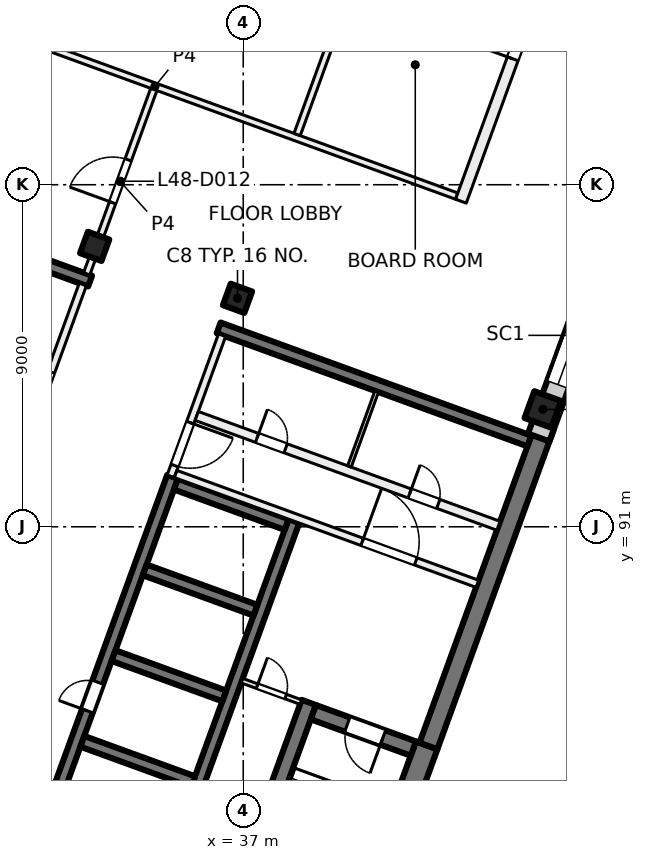
"""IFC4 building model, lengths in metres.
Left out: names, types, materials, properties, quantities, classifications, styles, units other than length and angle.
Written with IfcOpenShell. Run it as: python <this file> out.ifc"""

import sys

from ifc_helpers import new_model, si_unit, direction, frame, frame_2d, origin, origin_2d, place, context, subcontext, project, spatial, rectangle, extrude, element, fill, save


model = new_model("IFC4")
c1 = context("Model", 3, precision=1e-05, world=origin(), true_north=direction((0.0, 1.0)))
c2 = subcontext(c1, "Body", "Model", "MODEL_VIEW")
j1 = project(units=[si_unit("LENGTHUNIT", "METRE"), si_unit("PLANEANGLEUNIT", "RADIAN")], contexts=[c1])
p1 = place(None, origin())
s1 = spatial("IfcSite", under=j1, at=p1, CompositionType="ELEMENT")
p2 = place(p1, origin())
s2 = spatial("IfcBuilding", under=s1, at=p2, CompositionType="ELEMENT")
p3 = place(p2, frame((0.0, 0.0, 204.0)))
s3 = spatial("IfcBuildingStorey", under=s2, at=p3, CompositionType="ELEMENT", Elevation=204.0)
for number, where, z_axis, x_axis in (
    (1, (36.849, 97.011, 0.0), (0.0, 0.0, 1.0), (-0.342, -0.94, 0.0)),
    (2, (33.091, 98.379, 0.0), (0.0, 0.0, 1.0), (-0.342, -0.94, 0.0)),
):
    element("IfcColumn", number, at=place(p3, frame(where, z_axis=z_axis, x_axis=x_axis)), inside=s3, PredefinedType="COLUMN", context=c2, shape_type="SweptSolid", body=[
        extrude(rectangle(XDim=0.6, YDim=0.6, at=origin_2d()), origin(), (0.0, 0.0, 1.0), 4.0),
    ])
p4 = place(p3, frame((44.884, 94.087, 0.0), z_axis=(0.0, 0.0, 1.0), x_axis=(-0.342020143326, -0.939692620786, 0.0)))
e3 = element("IfcColumn", 3, at=p4, inside=s3, PredefinedType="COLUMN", context=c2, shape_type="SweptSolid", body=[
    extrude(rectangle(XDim=0.75, YDim=0.75, at=origin_2d()), origin(), (0.0, 0.0, 1.0), 4.0),
])
p5 = place(p3, frame((39.159, 77.92, 0.0), z_axis=(0.0, 0.0, 1.0), x_axis=(0.342016982193, 0.939693771338, 0.0)))
e4 = element("IfcWall", 4, at=p5, inside=s3, PredefinedType="SHEAR", context=c2, shape_type="SweptSolid", body=[
    extrude(rectangle(XDim=7.8, YDim=0.6, at=frame_2d((3.9, 0.0))), origin(), (0.0, 0.0, 1.0), 4.0),
])
p6 = place(p3, frame((41.874, 85.232, 0.0), z_axis=(0.0, 0.0, 1.0), x_axis=(0.342020437038, 0.939692513883, 0.0)))
e5 = element("IfcWall", 5, at=p6, inside=s3, PredefinedType="SHEAR", context=c2, shape_type="SweptSolid", body=[
    extrude(rectangle(XDim=8.975, YDim=0.5, at=frame_2d((4.487, 0.0))), origin(), (0.0, 0.0, 1.0), 4.0),
])
p7 = place(p3, frame((36.058, 79.048, 0.0), z_axis=(0.0, 0.0, 1.0), x_axis=(0.342016982193, 0.939693771338, 0.0)))
e6 = element("IfcWall", 6, at=p7, inside=s3, PredefinedType="SHEAR", context=c2, shape_type="SweptSolid", body=[
    extrude(rectangle(XDim=7.8, YDim=0.4, at=frame_2d((3.9, 0.0))), origin(), (0.0, 0.0, 1.0), 4.0),
])
p8 = place(p3, frame((41.476, 85.164, 0.0), z_axis=(0.0, 0.0, 1.0), x_axis=(-0.939678810556, 0.342058084236, 0.0)))
e7 = element("IfcWall", 7, at=p8, inside=s3, PredefinedType="SHEAR", context=c2, shape_type="SweptSolid", body=[
    extrude(rectangle(XDim=2.8, YDim=0.4, at=frame_2d((1.4, 0.0))), origin(), (0.0, 0.0, 1.0), 4.0),
])
p9 = place(p8, frame((0.85, 0.0, 0.0)))
e8 = element("IfcOpeningElement", 8, at=p9, cuts=e7, PredefinedType="OPENING", context=c2, shape_type="SweptSolid", body=[
    extrude(rectangle(XDim=1.0, YDim=2.1, at=frame_2d((0.5, 1.05))), frame((0.0, 0.21, 0.0), z_axis=(0.0, -1.0, 0.0), x_axis=(1.0, 0.0, 0.0)), (0.0, 0.0, 1.0), 0.42),
])
p10 = place(p3, frame((30.949, 80.801, 0.0), z_axis=(0.0, 0.0, 1.0), x_axis=(0.342016684409, 0.939693879721, 0.0)))
e9 = element("IfcWall", 9, at=p10, inside=s3, PredefinedType="SHEAR", context=c2, shape_type="SweptSolid", body=[
    extrude(rectangle(XDim=12.25, YDim=0.3, at=frame_2d((6.125, 0.0))), origin(), (0.0, 0.0, 1.0), 4.0),
])
p11 = place(p10, frame((0.9, 0.0, 0.0)))
e10 = element("IfcOpeningElement", 10, at=p11, cuts=e9, PredefinedType="OPENING", context=c2, shape_type="SweptSolid", body=[
    extrude(rectangle(XDim=0.8, YDim=2.1, at=frame_2d((0.4, 1.05))), frame((0.0, 0.16, 0.0), z_axis=(0.0, -1.0, 0.0), x_axis=(1.0, 0.0, 0.0)), (0.0, 0.0, 1.0), 0.32),
])
p12 = place(p10, frame((5.7, 0.0, 0.0)))
e11 = element("IfcOpeningElement", 11, at=p12, cuts=e9, PredefinedType="OPENING", context=c2, shape_type="SweptSolid", body=[
    extrude(rectangle(XDim=0.8, YDim=2.1, at=frame_2d((0.4, 1.05))), frame((0.0, 0.16, 0.0), z_axis=(0.0, -1.0, 0.0), x_axis=(1.0, 0.0, 0.0)), (0.0, 0.0, 1.0), 0.32),
])
p13 = place(p3, frame((34.144, 79.638, 0.0), z_axis=(0.0, 0.0, 1.0), x_axis=(0.342016684409, 0.939693879721, 0.0)))
e12 = element("IfcWall", 12, at=p13, inside=s3, PredefinedType="SHEAR", context=c2, shape_type="SweptSolid", body=[
    extrude(rectangle(XDim=12.25, YDim=0.3, at=frame_2d((6.125, 0.0))), origin(), (0.0, 0.0, 1.0), 4.0),
])
p14 = place(p3, frame((35.679, 84.294, 0.0), z_axis=(0.0, 0.0, 1.0), x_axis=(-0.939706007505, 0.341983361377, 0.0)))
e13 = element("IfcWall", 13, at=p14, inside=s3, PredefinedType="SHEAR", context=c2, shape_type="SweptSolid", body=[
    extrude(rectangle(XDim=3.1, YDim=0.3, at=frame_2d((1.55, 0.0))), origin(), (0.0, 0.0, 1.0), 4.0),
])
for number, where, z_axis, x_axis in (
    (14, (36.5, 86.549, 0.0), (0.0, 0.0, 1.0), (-0.94, 0.342, 0.0)),
    (15, (37.321, 88.805, 0.0), (0.0, 0.0, 1.0), (-0.94, 0.342, 0.0)),
    (16, (38.142, 91.06, 0.0), (0.0, 0.0, 1.0), (-0.94, 0.342, 0.0)),
):
    element("IfcWall", number, at=place(p3, frame(where, z_axis=z_axis, x_axis=x_axis)), inside=s3, PredefinedType="SHEAR", context=c2, shape_type="SweptSolid", body=[
        extrude(rectangle(XDim=3.1, YDim=0.3, at=frame_2d((1.55, 0.0))), origin(), (0.0, 0.0, 1.0), 4.0),
    ])
p15 = place(p3, frame((44.529, 93.258, 0.0), z_axis=(0.0, 0.0, 1.0), x_axis=(-0.9396917844, 0.342022441267, 0.0)))
e17 = element("IfcWall", 17, at=p15, inside=s3, PredefinedType="SHEAR", context=c2, shape_type="SweptSolid", body=[
    extrude(rectangle(XDim=8.7, YDim=0.3, at=frame_2d((4.35, 0.0))), origin(), (0.0, 0.0, 1.0), 4.0),
])
p16 = place(p3, frame((32.971, 97.465, 0.0), z_axis=(0.0, 0.0, 1.0), x_axis=(-0.939695066972, 0.34201342241, 0.0)))
e18 = element("IfcWall", 18, at=p16, inside=s3, PredefinedType="SHEAR", context=c2, shape_type="SweptSolid", body=[
    extrude(rectangle(XDim=8.7, YDim=0.3, at=frame_2d((4.35, 0.0))), origin(), (0.0, 0.0, 1.0), 4.0),
])
p17 = place(p3, frame((52.212, 113.783, 0.0), z_axis=(0.0, 0.0, 1.0), x_axis=(-0.34202521188, -0.939690775968, 0.0)))
e19 = element("IfcWall", 19, at=p17, inside=s3, PredefinedType="SOLIDWALL", context=c2, shape_type="SweptSolid", body=[
    extrude(rectangle(XDim=21.745, YDim=0.6, at=frame_2d((10.873, 0.0))), origin(), (0.0, 0.0, 1.0), 3.625),
])
p18 = place(p17, frame((3.765, 0.0, 0.9)))
e20 = element("IfcOpeningElement", 20, at=p18, cuts=e19, PredefinedType="OPENING", context=c2, shape_type="SweptSolid", body=[
    extrude(rectangle(XDim=3.0, YDim=2.4, at=frame_2d((1.5, 1.2))), frame((0.0, 0.31, 0.0), z_axis=(0.0, -1.0, 0.0), x_axis=(1.0, 0.0, 0.0)), (0.0, 0.0, 1.0), 0.62),
])
p19 = place(p17, frame((8.265, 0.0, 0.9)))
e21 = element("IfcOpeningElement", 21, at=p19, cuts=e19, PredefinedType="OPENING", context=c2, shape_type="SweptSolid", body=[
    extrude(rectangle(XDim=3.0, YDim=2.4, at=frame_2d((1.5, 1.2))), frame((0.0, 0.31, 0.0), z_axis=(0.0, -1.0, 0.0), x_axis=(1.0, 0.0, 0.0)), (0.0, 0.0, 1.0), 0.62),
])
p20 = place(p17, frame((12.765, 0.0, 0.9)))
e22 = element("IfcOpeningElement", 22, at=p20, cuts=e19, PredefinedType="OPENING", context=c2, shape_type="SweptSolid", body=[
    extrude(rectangle(XDim=3.0, YDim=2.4, at=frame_2d((1.5, 1.2))), frame((0.0, 0.31, 0.0), z_axis=(0.0, -1.0, 0.0), x_axis=(1.0, 0.0, 0.0)), (0.0, 0.0, 1.0), 0.62),
])
p21 = place(p17, frame((17.265, 0.0, 0.9)))
e23 = element("IfcOpeningElement", 23, at=p21, cuts=e19, PredefinedType="OPENING", context=c2, shape_type="SweptSolid", body=[
    extrude(rectangle(XDim=3.0, YDim=2.4, at=frame_2d((1.5, 1.2))), frame((0.0, 0.31, 0.0), z_axis=(0.0, -1.0, 0.0), x_axis=(1.0, 0.0, 0.0)), (0.0, 0.0, 1.0), 0.62),
])
p22 = place(p3, frame((24.666, 100.669, 0.0), z_axis=(0.0, 0.0, 1.0), x_axis=(0.34201964167, 0.939692803373, 0.0)))
e24 = element("IfcWall", 24, at=p22, inside=s3, PredefinedType="SOLIDWALL", context=c2, shape_type="SweptSolid", body=[
    extrude(rectangle(XDim=32.884, YDim=0.6, at=frame_2d((16.442, 0.0))), origin(), (0.0, 0.0, 1.0), 3.625),
])
p23 = place(p22, frame((1.48, 0.0, 0.9)))
e25 = element("IfcOpeningElement", 25, at=p23, cuts=e24, PredefinedType="OPENING", context=c2, shape_type="SweptSolid", body=[
    extrude(rectangle(XDim=3.0, YDim=2.4, at=frame_2d((1.5, 1.2))), frame((0.0, 0.31, 0.0), z_axis=(0.0, -1.0, 0.0), x_axis=(1.0, 0.0, 0.0)), (0.0, 0.0, 1.0), 0.62),
])
p24 = place(p22, frame((5.98, 0.0, 0.9)))
e26 = element("IfcOpeningElement", 26, at=p24, cuts=e24, PredefinedType="OPENING", context=c2, shape_type="SweptSolid", body=[
    extrude(rectangle(XDim=3.0, YDim=2.4, at=frame_2d((1.5, 1.2))), frame((0.0, 0.31, 0.0), z_axis=(0.0, -1.0, 0.0), x_axis=(1.0, 0.0, 0.0)), (0.0, 0.0, 1.0), 0.62),
])
p25 = place(p22, frame((10.48, 0.0, 0.9)))
e27 = element("IfcOpeningElement", 27, at=p25, cuts=e24, PredefinedType="OPENING", context=c2, shape_type="SweptSolid", body=[
    extrude(rectangle(XDim=3.0, YDim=2.4, at=frame_2d((1.5, 1.2))), frame((0.0, 0.31, 0.0), z_axis=(0.0, -1.0, 0.0), x_axis=(1.0, 0.0, 0.0)), (0.0, 0.0, 1.0), 0.62),
])
p26 = place(p22, frame((15.58, 0.0, 0.0)))
e28 = element("IfcOpeningElement", 28, at=p26, cuts=e24, PredefinedType="OPENING", context=c2, shape_type="SweptSolid", body=[
    extrude(rectangle(XDim=1.8, YDim=2.4, at=frame_2d((0.9, 1.2))), frame((0.0, 0.31, 0.0), z_axis=(0.0, -1.0, 0.0), x_axis=(1.0, 0.0, 0.0)), (0.0, 0.0, 1.0), 0.62),
])
p27 = place(p22, frame((19.48, 0.0, 0.9)))
e29 = element("IfcOpeningElement", 29, at=p27, cuts=e24, PredefinedType="OPENING", context=c2, shape_type="SweptSolid", body=[
    extrude(rectangle(XDim=3.0, YDim=2.4, at=frame_2d((1.5, 1.2))), frame((0.0, 0.31, 0.0), z_axis=(0.0, -1.0, 0.0), x_axis=(1.0, 0.0, 0.0)), (0.0, 0.0, 1.0), 0.62),
])
p28 = place(p22, frame((23.98, 0.0, 0.9)))
e30 = element("IfcOpeningElement", 30, at=p28, cuts=e24, PredefinedType="OPENING", context=c2, shape_type="SweptSolid", body=[
    extrude(rectangle(XDim=3.0, YDim=2.4, at=frame_2d((1.5, 1.2))), frame((0.0, 0.31, 0.0), z_axis=(0.0, -1.0, 0.0), x_axis=(1.0, 0.0, 0.0)), (0.0, 0.0, 1.0), 0.62),
])
p29 = place(p22, frame((29.08, 0.0, 0.0)))
e31 = element("IfcOpeningElement", 31, at=p29, cuts=e24, PredefinedType="OPENING", context=c2, shape_type="SweptSolid", body=[
    extrude(rectangle(XDim=1.8, YDim=2.4, at=frame_2d((0.9, 1.2))), frame((0.0, 0.31, 0.0), z_axis=(0.0, -1.0, 0.0), x_axis=(1.0, 0.0, 0.0)), (0.0, 0.0, 1.0), 0.62),
])
p30 = place(p3, frame((31.427, 93.663, 0.0), z_axis=(0.0, 0.0, 1.0), x_axis=(0.342030870568, 0.93968871632, 0.0)))
e32 = element("IfcWall", 32, at=p30, inside=s3, PredefinedType="PARTITIONING", context=c2, shape_type="SweptSolid", body=[
    extrude(rectangle(XDim=3.95, YDim=0.2, at=frame_2d((1.975, 0.0))), origin(), (0.0, 0.0, 1.0), 3.625),
])
p31 = place(p30, frame((0.3, 0.0, 0.0)))
e33 = element("IfcOpeningElement", 33, at=p31, cuts=e32, PredefinedType="OPENING", context=c2, shape_type="SweptSolid", body=[
    extrude(rectangle(XDim=1.2, YDim=2.1, at=frame_2d((0.6, 1.05))), frame((0.0, 0.11, 0.0), z_axis=(0.0, -1.0, 0.0), x_axis=(1.0, 0.0, 0.0)), (0.0, 0.0, 1.0), 0.22),
])
p32 = place(p3, frame((23.983, 98.208, 0.0), z_axis=(0.0, 0.0, 1.0), x_axis=(0.939699751196, -0.342000552051, 0.0)))
e34 = element("IfcWall", 34, at=p32, inside=s3, PredefinedType="PARTITIONING", context=c2, shape_type="SweptSolid", body=[
    extrude(rectangle(XDim=8.45, YDim=0.25, at=frame_2d((4.225, 0.0))), origin(), (0.0, 0.0, 1.0), 3.625),
])
p33 = place(p32, frame((5.96, 0.0, 0.0)))
e35 = element("IfcOpeningElement", 35, at=p33, cuts=e34, PredefinedType="OPENING", context=c2, shape_type="SweptSolid", body=[
    extrude(rectangle(XDim=0.8, YDim=2.1, at=frame_2d((0.4, 1.05))), frame((0.0, 0.135, 0.0), z_axis=(0.0, -1.0, 0.0), x_axis=(1.0, 0.0, 0.0)), (0.0, 0.0, 1.0), 0.27),
])
p34 = place(p32, frame((1.585, 0.0, 0.0)))
e36 = element("IfcOpeningElement", 36, at=p34, cuts=e34, PredefinedType="OPENING", context=c2, shape_type="SweptSolid", body=[
    extrude(rectangle(XDim=1.0, YDim=2.1, at=frame_2d((0.5, 1.05))), frame((0.0, 0.135, 0.0), z_axis=(0.0, -1.0, 0.0), x_axis=(1.0, 0.0, 0.0)), (0.0, 0.0, 1.0), 0.27),
])
p35 = place(p3, frame((36.443, 96.041, 0.0), z_axis=(0.0, 0.0, 1.0), x_axis=(-0.341996156931, -0.939701350773, 0.0)))
e37 = element("IfcWall", 37, at=p35, inside=s3, PredefinedType="PARTITIONING", context=c2, shape_type="SweptSolid", body=[
    extrude(rectangle(XDim=3.95, YDim=0.2, at=frame_2d((1.975, 0.0))), origin(), (0.0, 0.0, 1.0), 3.625),
])
p36 = place(p35, frame((2.45, 0.0, 0.0)))
e38 = element("IfcOpeningElement", 38, at=p36, cuts=e37, PredefinedType="OPENING", context=c2, shape_type="SweptSolid", body=[
    extrude(rectangle(XDim=1.2, YDim=2.1, at=frame_2d((0.6, 1.05))), frame((0.0, 0.11, 0.0), z_axis=(0.0, -1.0, 0.0), x_axis=(1.0, 0.0, 0.0)), (0.0, 0.0, 1.0), 0.22),
])
p37 = place(p3, frame((35.22, 92.389, 0.0), z_axis=(0.0, 0.0, 1.0), x_axis=(0.939690465531, -0.342026064782, 0.0)))
e39 = element("IfcWall", 39, at=p37, inside=s3, PredefinedType="PARTITIONING", context=c2, shape_type="SweptSolid", body=[
    extrude(rectangle(XDim=8.45, YDim=0.2, at=frame_2d((4.225, 0.0))), origin(), (0.0, 0.0, 1.0), 3.625),
])
p38 = place(p37, frame((5.225, 0.0, 0.0)))
e40 = element("IfcOpeningElement", 40, at=p38, cuts=e39, PredefinedType="OPENING", context=c2, shape_type="SweptSolid", body=[
    extrude(rectangle(XDim=1.5, YDim=2.1, at=frame_2d((0.75, 1.05))), frame((0.0, 0.11, 0.0), z_axis=(0.0, -1.0, 0.0), x_axis=(1.0, 0.0, 0.0)), (0.0, 0.0, 1.0), 0.22),
])
p39 = place(p3, frame((35.776, 93.916, 0.0), z_axis=(0.0, 0.0, 1.0), x_axis=(0.939690465531, -0.342026064782, 0.0)))
e41 = element("IfcWall", 41, at=p39, inside=s3, PredefinedType="PARTITIONING", context=c2, shape_type="SweptSolid", body=[
    extrude(rectangle(XDim=8.45, YDim=0.25, at=frame_2d((4.225, 0.0))), origin(), (0.0, 0.0, 1.0), 3.625),
])
p40 = place(p39, frame((1.69, 0.0, 0.0)))
e42 = element("IfcOpeningElement", 42, at=p40, cuts=e41, PredefinedType="OPENING", context=c2, shape_type="SweptSolid", body=[
    extrude(rectangle(XDim=0.8, YDim=2.1, at=frame_2d((0.4, 1.05))), frame((0.0, 0.135, 0.0), z_axis=(0.0, -1.0, 0.0), x_axis=(1.0, 0.0, 0.0)), (0.0, 0.0, 1.0), 0.27),
])
p41 = place(p39, frame((5.965, 0.0, 0.0)))
e43 = element("IfcOpeningElement", 43, at=p41, cuts=e41, PredefinedType="OPENING", context=c2, shape_type="SweptSolid", body=[
    extrude(rectangle(XDim=0.8, YDim=2.1, at=frame_2d((0.4, 1.05))), frame((0.0, 0.135, 0.0), z_axis=(0.0, -1.0, 0.0), x_axis=(1.0, 0.0, 0.0)), (0.0, 0.0, 1.0), 0.27),
])
p42 = place(p3, frame((36.966, 86.952, 0.0), z_axis=(0.0, 0.0, 1.0), x_axis=(0.939672407396, -0.342075674051, 0.0)))
e44 = element("IfcWall", 44, at=p42, inside=s3, PredefinedType="PARTITIONING", context=c2, shape_type="SweptSolid", body=[
    extrude(rectangle(XDim=1.65, YDim=0.125, at=frame_2d((0.825, 0.0))), origin(), (0.0, 0.0, 1.0), 3.625),
])
p43 = place(p42, frame((0.425, 0.0, 0.0)))
e45 = element("IfcOpeningElement", 45, at=p43, cuts=e44, PredefinedType="OPENING", context=c2, shape_type="SweptSolid", body=[
    extrude(rectangle(XDim=0.8, YDim=2.1, at=frame_2d((0.4, 1.05))), frame((0.0, 0.073, 0.0), z_axis=(0.0, -1.0, 0.0), x_axis=(1.0, 0.0, 0.0)), (0.0, 0.0, 1.0), 0.145),
])
p44 = place(p3, frame((40.512, 94.56, 0.0), z_axis=(0.0, 0.0, 1.0), x_axis=(-0.342023078919, -0.939691552312, 0.0)))
e46 = element("IfcWall", 46, at=p44, inside=s3, PredefinedType="PARTITIONING", context=c2, shape_type="SweptSolid", body=[
    extrude(rectangle(XDim=2.1, YDim=0.1, at=frame_2d((1.05, 0.0))), origin(), (0.0, 0.0, 1.0), 3.625),
])
p45 = place(p3, frame((26.736, 105.48, 0.0), z_axis=(0.0, 0.0, 1.0), x_axis=(0.939695108427, -0.342013308511, 0.0)))
e47 = element("IfcWall", 47, at=p45, inside=s3, PredefinedType="PARTITIONING", context=c2, shape_type="SweptSolid", body=[
    extrude(rectangle(XDim=16.9, YDim=0.175, at=frame_2d((8.45, 0.0))), origin(), (0.0, 0.0, 1.0), 3.625),
])
p46 = place(p3, frame((32.881, 97.657, 0.0), z_axis=(0.0, 0.0, 1.0), x_axis=(0.342058204353, 0.939678766832, 0.0)))
e48 = element("IfcWall", 48, at=p46, inside=s3, PredefinedType="PARTITIONING", context=c2, shape_type="SweptSolid", body=[
    extrude(rectangle(XDim=5.163, YDim=0.175, at=frame_2d((2.581, 0.0))), origin(), (0.0, 0.0, 1.0), 3.625),
])
p47 = place(p46, frame((1.991, 0.0, 0.0)))
e49 = element("IfcOpeningElement", 49, at=p47, cuts=e48, PredefinedType="OPENING", context=c2, shape_type="SweptSolid", body=[
    extrude(rectangle(XDim=1.2, YDim=2.1, at=frame_2d((0.6, 1.05))), frame((0.0, 0.097, 0.0), z_axis=(0.0, -1.0, 0.0), x_axis=(1.0, 0.0, 0.0)), (0.0, 0.0, 1.0), 0.195),
])
p48 = place(p3, frame((38.418, 101.321, 0.0), z_axis=(0.0, 0.0, 1.0), x_axis=(0.342082778631, 0.939669821035, 0.0)))
e50 = element("IfcWall", 50, at=p48, inside=s3, PredefinedType="PARTITIONING", context=c2, shape_type="SweptSolid", body=[
    extrude(rectangle(XDim=9.001, YDim=0.175, at=frame_2d((4.5, 0.0))), origin(), (0.0, 0.0, 1.0), 3.625),
])
p49 = place(p3, frame((42.728, 99.567, 0.0), z_axis=(0.0, 0.0, 1.0), x_axis=(0.342016197204, 0.939694057048, 0.0)))
e51 = element("IfcWall", 51, at=p49, inside=s3, PredefinedType="PARTITIONING", context=c2, shape_type="SweptSolid", body=[
    extrude(rectangle(XDim=23.18, YDim=0.3, at=frame_2d((11.59, 0.0))), origin(), (0.0, 0.0, 1.0), 3.625),
])
p50 = place(p49, frame((3.987, 0.0, 0.0)))
e52 = element("IfcOpeningElement", 52, at=p50, cuts=e51, PredefinedType="OPENING", context=c2, shape_type="SweptSolid", body=[
    extrude(rectangle(XDim=1.2, YDim=2.1, at=frame_2d((0.6, 1.05))), frame((0.0, 0.16, 0.0), z_axis=(0.0, -1.0, 0.0), x_axis=(1.0, 0.0, 0.0)), (0.0, 0.0, 1.0), 0.32),
])
p51 = place(p49, frame((10.437, 0.0, 0.0)))
e53 = element("IfcOpeningElement", 53, at=p51, cuts=e51, PredefinedType="OPENING", context=c2, shape_type="SweptSolid", body=[
    extrude(rectangle(XDim=1.8, YDim=2.1, at=frame_2d((0.9, 1.05))), frame((0.0, 0.16, 0.0), z_axis=(0.0, -1.0, 0.0), x_axis=(1.0, 0.0, 0.0)), (0.0, 0.0, 1.0), 0.32),
])
p52 = place(p49, frame((14.687, 0.0, 0.0)))
e54 = element("IfcOpeningElement", 54, at=p52, cuts=e51, PredefinedType="OPENING", context=c2, shape_type="SweptSolid", body=[
    extrude(rectangle(XDim=0.8, YDim=2.1, at=frame_2d((0.4, 1.05))), frame((0.0, 0.16, 0.0), z_axis=(0.0, -1.0, 0.0), x_axis=(1.0, 0.0, 0.0)), (0.0, 0.0, 1.0), 0.32),
])
p53 = place(p21, origin())
e55 = element("IfcWindow", 55, at=p53, inside=s3, PartitioningType="SINGLE_PANEL", PredefinedType="WINDOW", context=c2, shape_type="SweptSolid", body=[
    extrude(rectangle(XDim=3.0, YDim=2.4, at=frame_2d((1.5, 1.2))), frame((0.0, 0.03, 0.0), z_axis=(0.0, -1.0, 0.0), x_axis=(1.0, 0.0, 0.0)), (0.0, 0.0, 1.0), 0.06),
])
fill(e23, e55)
p54 = place(p12, origin())
e56 = element("IfcDoor", 56, at=p54, inside=s3, OperationType="SINGLE_SWING_RIGHT", PredefinedType="DOOR", context=c2, shape_type="SweptSolid", body=[
    extrude(rectangle(XDim=0.8, YDim=2.1, at=frame_2d((0.4, 1.05))), frame((0.0, 0.025, 0.0), z_axis=(0.0, -1.0, 0.0), x_axis=(1.0, 0.0, 0.0)), (0.0, 0.0, 1.0), 0.05),
])
fill(e11, e56)
p55 = place(p31, origin())
e57 = element("IfcDoor", 57, at=p55, inside=s3, OperationType="DOUBLE_DOOR_SINGLE_SWING", PredefinedType="DOOR", context=c2, shape_type="SweptSolid", body=[
    extrude(rectangle(XDim=1.2, YDim=2.1, at=frame_2d((0.6, 1.05))), frame((0.0, 0.025, 0.0), z_axis=(0.0, -1.0, 0.0), x_axis=(1.0, 0.0, 0.0)), (0.0, 0.0, 1.0), 0.05),
])
fill(e33, e57)
p56 = place(p36, origin())
e58 = element("IfcDoor", 58, at=p56, inside=s3, OperationType="DOUBLE_DOOR_SINGLE_SWING", PredefinedType="DOOR", context=c2, shape_type="SweptSolid", body=[
    extrude(rectangle(XDim=1.2, YDim=2.1, at=frame_2d((0.6, 1.05))), frame((0.0, 0.025, 0.0), z_axis=(0.0, -1.0, 0.0), x_axis=(1.0, 0.0, 0.0)), (0.0, 0.0, 1.0), 0.05),
])
fill(e38, e58)
p57 = place(p38, origin())
e59 = element("IfcDoor", 59, at=p57, inside=s3, OperationType="DOUBLE_DOOR_SINGLE_SWING", PredefinedType="DOOR", context=c2, shape_type="SweptSolid", body=[
    extrude(rectangle(XDim=1.5, YDim=2.1, at=frame_2d((0.75, 1.05))), frame((0.0, 0.025, 0.0), z_axis=(0.0, -1.0, 0.0), x_axis=(1.0, 0.0, 0.0)), (0.0, 0.0, 1.0), 0.05),
])
fill(e40, e59)
p58 = place(p9, origin())
e60 = element("IfcDoor", 60, at=p58, inside=s3, OperationType="SINGLE_SWING_RIGHT", PredefinedType="DOOR", context=c2, shape_type="SweptSolid", body=[
    extrude(rectangle(XDim=1.0, YDim=2.1, at=frame_2d((0.5, 1.05))), frame((0.0, 0.025, 0.0), z_axis=(0.0, -1.0, 0.0), x_axis=(1.0, 0.0, 0.0)), (0.0, 0.0, 1.0), 0.05),
])
fill(e8, e60)
p59 = place(p43, origin())
e61 = element("IfcDoor", 61, at=p59, inside=s3, OperationType="SINGLE_SWING_LEFT", PredefinedType="DOOR", context=c2, shape_type="SweptSolid", body=[
    extrude(rectangle(XDim=0.8, YDim=2.1, at=frame_2d((0.4, 1.05))), frame((0.0, 0.025, 0.0), z_axis=(0.0, -1.0, 0.0), x_axis=(1.0, 0.0, 0.0)), (0.0, 0.0, 1.0), 0.05),
])
fill(e45, e61)
p60 = place(p40, origin())
e62 = element("IfcDoor", 62, at=p60, inside=s3, OperationType="SINGLE_SWING_RIGHT", PredefinedType="DOOR", context=c2, shape_type="SweptSolid", body=[
    extrude(rectangle(XDim=0.8, YDim=2.1, at=frame_2d((0.4, 1.05))), frame((0.0, 0.025, 0.0), z_axis=(0.0, -1.0, 0.0), x_axis=(1.0, 0.0, 0.0)), (0.0, 0.0, 1.0), 0.05),
])
fill(e42, e62)
p61 = place(p41, origin())
e63 = element("IfcDoor", 63, at=p61, inside=s3, OperationType="SINGLE_SWING_LEFT", PredefinedType="DOOR", context=c2, shape_type="SweptSolid", body=[
    extrude(rectangle(XDim=0.8, YDim=2.1, at=frame_2d((0.4, 1.05))), frame((0.0, 0.025, 0.0), z_axis=(0.0, -1.0, 0.0), x_axis=(1.0, 0.0, 0.0)), (0.0, 0.0, 1.0), 0.05),
])
fill(e43, e63)
p62 = place(p47, origin())
e64 = element("IfcDoor", 64, at=p62, inside=s3, OperationType="DOUBLE_DOOR_SINGLE_SWING", PredefinedType="DOOR", context=c2, shape_type="SweptSolid", body=[
    extrude(rectangle(XDim=1.2, YDim=2.1, at=frame_2d((0.6, 1.05))), frame((0.0, 0.025, 0.0), z_axis=(0.0, -1.0, 0.0), x_axis=(1.0, 0.0, 0.0)), (0.0, 0.0, 1.0), 0.05),
])
fill(e49, e64)
p63 = place(p50, origin())
e65 = element("IfcDoor", 65, at=p63, inside=s3, OperationType="DOUBLE_DOOR_SINGLE_SWING", PredefinedType="DOOR", context=c2, shape_type="SweptSolid", body=[
    extrude(rectangle(XDim=1.2, YDim=2.1, at=frame_2d((0.6, 1.05))), frame((0.0, 0.025, 0.0), z_axis=(0.0, -1.0, 0.0), x_axis=(1.0, 0.0, 0.0)), (0.0, 0.0, 1.0), 0.05),
])
fill(e52, e65)
save(model, sys.argv[1])
